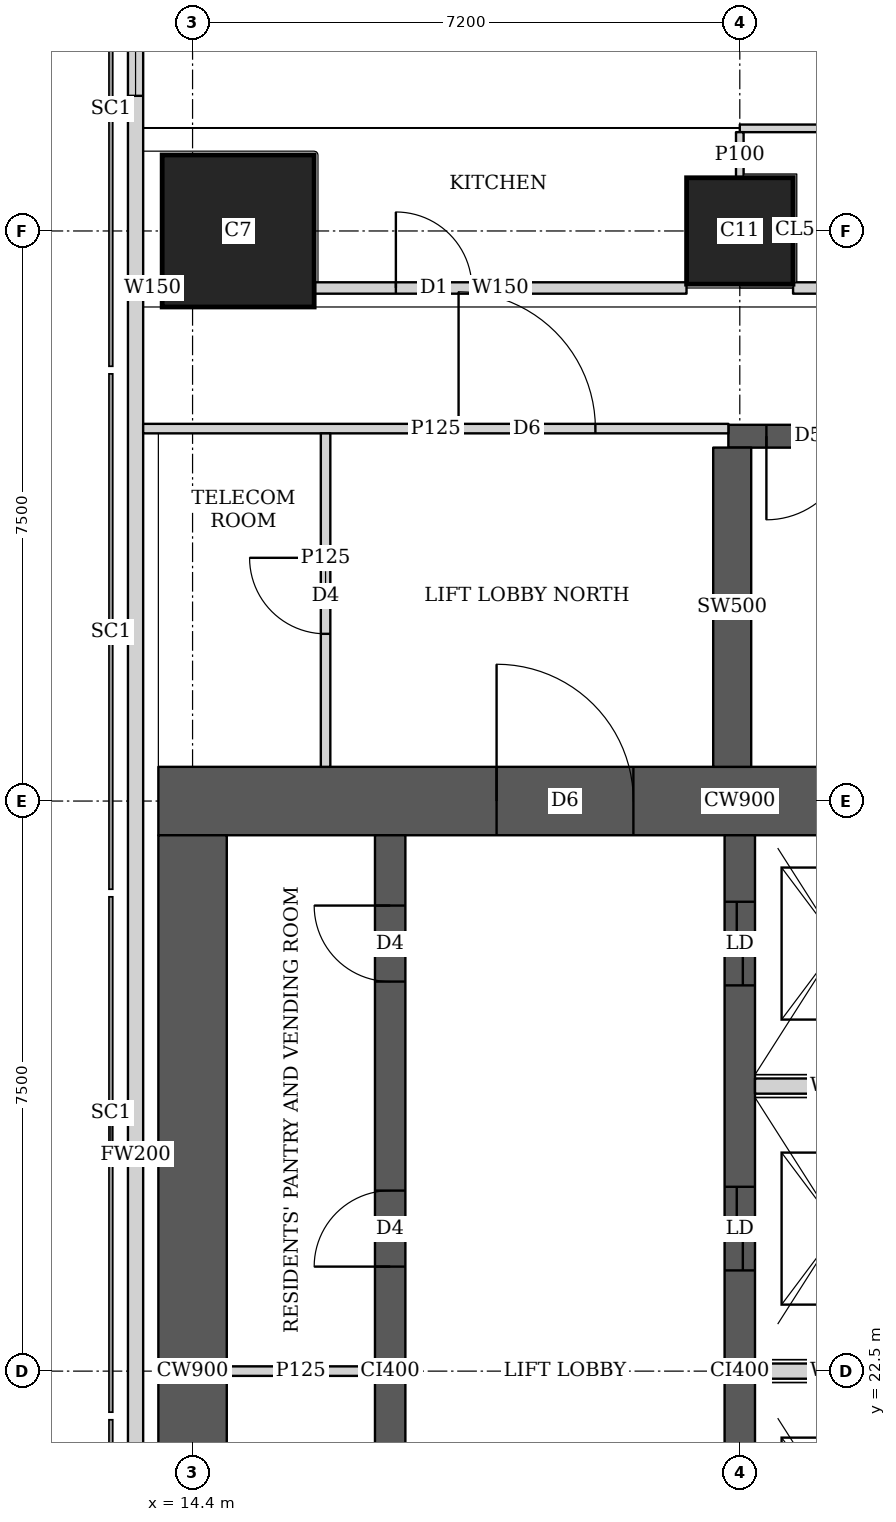
"""IFC4 building model, lengths in metres.
Left out: names, types, materials, properties, quantities, classifications, styles, units other than length and angle.
Written with IfcOpenShell. Run it as: python <this file> out.ifc"""

import sys

from ifc_helpers import new_model, si_unit, direction, frame, frame_2d, origin, origin_2d, place, context, subcontext, project, spatial, rectangle, extrude, element, fill, save


model = new_model("IFC4")
c1 = context("Model", 3, precision=1e-05, world=origin(), true_north=direction((0.0, 1.0)))
c2 = subcontext(c1, "Body", "Model", "MODEL_VIEW")
j1 = project(units=[si_unit("LENGTHUNIT", "METRE"), si_unit("PLANEANGLEUNIT", "RADIAN")], contexts=[c1])
p1 = place(None, origin())
s1 = spatial("IfcSite", under=j1, at=p1, CompositionType="ELEMENT")
p2 = place(p1, origin())
s2 = spatial("IfcBuilding", under=s1, at=p2, CompositionType="ELEMENT")
p3 = place(p2, frame((0.0, 0.0, 255.35)))
s3 = spatial("IfcBuildingStorey", under=s2, at=p3, CompositionType="ELEMENT", Elevation=255.35)
p4 = place(p3, frame((15.0, 37.5, 0.0), z_axis=(0.0, 0.0, 1.0), x_axis=(1.0, 0.0, 0.0)))
e1 = element("IfcColumn", 1, at=p4, inside=s3, PredefinedType="COLUMN", context=c2, shape_type="SweptSolid", body=[
    extrude(rectangle(XDim=2.0, YDim=2.0, at=origin_2d()), origin(), (0.0, 0.0, 1.0), 3.75),
])
p5 = place(p3, frame((21.6, 37.5, 0.0), z_axis=(0.0, 0.0, 1.0), x_axis=(1.0, 0.0, 0.0)))
e2 = element("IfcColumn", 2, at=p5, inside=s3, PredefinedType="COLUMN", context=c2, shape_type="SweptSolid", body=[
    extrude(rectangle(XDim=1.4, YDim=1.4, at=origin_2d()), origin(), (0.0, 0.0, 1.0), 3.75),
])
p6 = place(p3, frame((13.95, 30.0, 0.0), z_axis=(0.0, 0.0, 1.0), x_axis=(1.0, 0.0, 0.0)))
e3 = element("IfcWall", 3, at=p6, inside=s3, PredefinedType="SHEAR", context=c2, shape_type="SweptSolid", body=[
    extrude(rectangle(XDim=15.3, YDim=0.9, at=frame_2d((7.65, 0.0))), origin(), (0.0, 0.0, 1.0), 3.75),
])
p7 = place(p6, frame((4.45, 0.0, 0.0)))
e4 = element("IfcOpeningElement", 4, at=p7, cuts=e3, PredefinedType="OPENING", context=c2, shape_type="SweptSolid", body=[
    extrude(rectangle(XDim=1.8, YDim=2.1, at=frame_2d((0.9, 1.05))), frame((0.0, 0.46, 0.0), z_axis=(0.0, -1.0, 0.0), x_axis=(1.0, 0.0, 0.0)), (0.0, 0.0, 1.0), 0.92),
])
p8 = place(p6, frame((10.7, 0.0, 0.0)))
e5 = element("IfcOpeningElement", 5, at=p8, cuts=e3, PredefinedType="OPENING", context=c2, shape_type="SweptSolid", body=[
    extrude(rectangle(XDim=1.1, YDim=2.1, at=frame_2d((0.55, 1.05))), frame((0.0, 0.46, 0.0), z_axis=(0.0, -1.0, 0.0), x_axis=(1.0, 0.0, 0.0)), (0.0, 0.0, 1.0), 0.92),
])
p9 = place(p3, frame((14.4, 15.45, 0.0), z_axis=(0.0, 0.0, 1.0), x_axis=(0.0, 1.0, 0.0)))
e6 = element("IfcWall", 6, at=p9, inside=s3, PredefinedType="SHEAR", context=c2, shape_type="SweptSolid", body=[
    extrude(rectangle(XDim=14.1, YDim=0.9, at=frame_2d((7.05, 0.0))), origin(), (0.0, 0.0, 1.0), 3.75),
])
p10 = place(p3, frame((17.0, 15.45, 0.0), z_axis=(0.0, 0.0, 1.0), x_axis=(0.0, 1.0, 0.0)))
e7 = element("IfcWall", 7, at=p10, inside=s3, PredefinedType="SHEAR", context=c2, shape_type="SweptSolid", body=[
    extrude(rectangle(XDim=14.1, YDim=0.4, at=frame_2d((7.05, 0.0))), origin(), (0.0, 0.0, 1.0), 3.75),
])
p11 = place(p10, frame((1.05, 0.0, 0.0)))
e8 = element("IfcOpeningElement", 8, at=p11, cuts=e7, PredefinedType="OPENING", context=c2, shape_type="SweptSolid", body=[
    extrude(rectangle(XDim=1.0, YDim=2.1, at=frame_2d((0.5, 1.05))), frame((0.0, 0.21, 0.0), z_axis=(0.0, -1.0, 0.0), x_axis=(1.0, 0.0, 0.0)), (0.0, 0.0, 1.0), 0.42),
])
p12 = place(p10, frame((4.675, 0.0, 0.0)))
e9 = element("IfcOpeningElement", 9, at=p12, cuts=e7, PredefinedType="OPENING", context=c2, shape_type="SweptSolid", body=[
    extrude(rectangle(XDim=1.0, YDim=2.1, at=frame_2d((0.5, 1.05))), frame((0.0, 0.21, 0.0), z_axis=(0.0, -1.0, 0.0), x_axis=(1.0, 0.0, 0.0)), (0.0, 0.0, 1.0), 0.42),
])
p13 = place(p10, frame((8.425, 0.0, 0.0)))
e10 = element("IfcOpeningElement", 10, at=p13, cuts=e7, PredefinedType="OPENING", context=c2, shape_type="SweptSolid", body=[
    extrude(rectangle(XDim=1.0, YDim=2.1, at=frame_2d((0.5, 1.05))), frame((0.0, 0.21, 0.0), z_axis=(0.0, -1.0, 0.0), x_axis=(1.0, 0.0, 0.0)), (0.0, 0.0, 1.0), 0.42),
])
p14 = place(p10, frame((12.175, 0.0, 0.0)))
e11 = element("IfcOpeningElement", 11, at=p14, cuts=e7, PredefinedType="OPENING", context=c2, shape_type="SweptSolid", body=[
    extrude(rectangle(XDim=1.0, YDim=2.1, at=frame_2d((0.5, 1.05))), frame((0.0, 0.21, 0.0), z_axis=(0.0, -1.0, 0.0), x_axis=(1.0, 0.0, 0.0)), (0.0, 0.0, 1.0), 0.42),
])
p15 = place(p3, frame((21.6, 15.45, 0.0), z_axis=(0.0, 0.0, 1.0), x_axis=(0.0, 1.0, 0.0)))
e12 = element("IfcWall", 12, at=p15, inside=s3, PredefinedType="SHEAR", context=c2, shape_type="SweptSolid", body=[
    extrude(rectangle(XDim=14.1, YDim=0.4, at=frame_2d((7.05, 0.0))), origin(), (0.0, 0.0, 1.0), 3.75),
])
p16 = place(p15, frame((0.875, 0.0, 0.0)))
e13 = element("IfcOpeningElement", 13, at=p16, cuts=e12, PredefinedType="OPENING", context=c2, shape_type="SweptSolid", body=[
    extrude(rectangle(XDim=1.1, YDim=2.1, at=frame_2d((0.55, 1.05))), frame((0.0, 0.21, 0.0), z_axis=(0.0, -1.0, 0.0), x_axis=(1.0, 0.0, 0.0)), (0.0, 0.0, 1.0), 0.42),
])
p17 = place(p15, frame((4.625, 0.0, 0.0)))
e14 = element("IfcOpeningElement", 14, at=p17, cuts=e12, PredefinedType="OPENING", context=c2, shape_type="SweptSolid", body=[
    extrude(rectangle(XDim=1.1, YDim=2.1, at=frame_2d((0.55, 1.05))), frame((0.0, 0.21, 0.0), z_axis=(0.0, -1.0, 0.0), x_axis=(1.0, 0.0, 0.0)), (0.0, 0.0, 1.0), 0.42),
])
p18 = place(p15, frame((8.375, 0.0, 0.0)))
e15 = element("IfcOpeningElement", 15, at=p18, cuts=e12, PredefinedType="OPENING", context=c2, shape_type="SweptSolid", body=[
    extrude(rectangle(XDim=1.1, YDim=2.1, at=frame_2d((0.55, 1.05))), frame((0.0, 0.21, 0.0), z_axis=(0.0, -1.0, 0.0), x_axis=(1.0, 0.0, 0.0)), (0.0, 0.0, 1.0), 0.42),
])
p19 = place(p15, frame((12.125, 0.0, 0.0)))
e16 = element("IfcOpeningElement", 16, at=p19, cuts=e12, PredefinedType="OPENING", context=c2, shape_type="SweptSolid", body=[
    extrude(rectangle(XDim=1.1, YDim=2.1, at=frame_2d((0.55, 1.05))), frame((0.0, 0.21, 0.0), z_axis=(0.0, -1.0, 0.0), x_axis=(1.0, 0.0, 0.0)), (0.0, 0.0, 1.0), 0.42),
])
p20 = place(p3, frame((21.45, 34.8, 0.0), z_axis=(0.0, 0.0, 1.0), x_axis=(1.0, 0.0, 0.0)))
e17 = element("IfcWall", 17, at=p20, inside=s3, PredefinedType="SHEAR", context=c2, shape_type="SweptSolid", body=[
    extrude(rectangle(XDim=7.5, YDim=0.3, at=frame_2d((3.75, 0.0))), origin(), (0.0, 0.0, 1.0), 3.75),
])
p21 = place(p20, frame((0.5, 0.0, 0.0)))
e18 = element("IfcOpeningElement", 18, at=p21, cuts=e17, PredefinedType="OPENING", context=c2, shape_type="SweptSolid", body=[
    extrude(rectangle(XDim=1.1, YDim=2.1, at=frame_2d((0.55, 1.05))), frame((0.0, 0.16, 0.0), z_axis=(0.0, -1.0, 0.0), x_axis=(1.0, 0.0, 0.0)), (0.0, 0.0, 1.0), 0.32),
])
p22 = place(p3, frame((21.5, 30.45, 0.0), z_axis=(0.0, 0.0, 1.0), x_axis=(0.0, 1.0, 0.0)))
e19 = element("IfcWall", 19, at=p22, inside=s3, PredefinedType="SHEAR", context=c2, shape_type="SweptSolid", body=[
    extrude(rectangle(XDim=4.2, YDim=0.5, at=frame_2d((2.1, 0.0))), origin(), (0.0, 0.0, 1.0), 3.75),
])
p23 = place(p3, frame((13.65, 43.037, 0.0), z_axis=(0.0, 0.0, 1.0), x_axis=(0.0, -1.0, 0.0)))
e20 = element("IfcWall", 20, at=p23, inside=s3, PredefinedType="SOLIDWALL", context=c2, shape_type="SweptSolid", body=[
    extrude(rectangle(XDim=35.374, YDim=0.2, at=frame_2d((17.687, 0.0))), origin(), (0.0, 0.0, 1.0), 3.5),
])
p24 = place(p23, frame((1.959, 0.0, 0.9)))
e21 = element("IfcOpeningElement", 21, at=p24, cuts=e20, PredefinedType="OPENING", context=c2, shape_type="SweptSolid", body=[
    extrude(rectangle(XDim=1.8, YDim=1.5, at=frame_2d((0.9, 0.75))), frame((0.0, 0.11, 0.0), z_axis=(0.0, -1.0, 0.0), x_axis=(1.0, 0.0, 0.0)), (0.0, 0.0, 1.0), 0.22),
])
p25 = place(p3, frame((13.75, 36.75, 0.0), z_axis=(0.0, 0.0, 1.0), x_axis=(1.0, 0.0, 0.0)))
e22 = element("IfcWall", 22, at=p25, inside=s3, PredefinedType="SOLIDWALL", context=c2, shape_type="SweptSolid", body=[
    extrude(rectangle(XDim=0.249, YDim=0.15, at=frame_2d((0.125, 0.0))), origin(), (0.0, 0.0, 1.0), 3.5),
])
p26 = place(p3, frame((16.001, 36.75, 0.0), z_axis=(0.0, 0.0, 1.0), x_axis=(1.0, 0.0, 0.0)))
e23 = element("IfcWall", 23, at=p26, inside=s3, PredefinedType="SOLIDWALL", context=c2, shape_type="SweptSolid", body=[
    extrude(rectangle(XDim=4.898, YDim=0.15, at=frame_2d((2.449, 0.0))), origin(), (0.0, 0.0, 1.0), 3.5),
])
p27 = place(p26, frame((1.074, 0.0, 0.0)))
e24 = element("IfcOpeningElement", 24, at=p27, cuts=e23, PredefinedType="OPENING", context=c2, shape_type="SweptSolid", body=[
    extrude(rectangle(XDim=1.0, YDim=2.1, at=frame_2d((0.5, 1.05))), frame((0.0, 0.085, 0.0), z_axis=(0.0, -1.0, 0.0), x_axis=(1.0, 0.0, 0.0)), (0.0, 0.0, 1.0), 0.17),
])
p28 = place(p3, frame((22.301, 36.75, 0.0), z_axis=(0.0, 0.0, 1.0), x_axis=(1.0, 0.0, 0.0)))
e25 = element("IfcWall", 25, at=p28, inside=s3, PredefinedType="SOLIDWALL", context=c2, shape_type="SweptSolid", body=[
    extrude(rectangle(XDim=5.798, YDim=0.15, at=frame_2d((2.899, 0.0))), origin(), (0.0, 0.0, 1.0), 3.5),
])
p29 = place(p3, frame((21.6, 38.85, 0.0), z_axis=(0.0, 0.0, 1.0), x_axis=(1.0, 0.0, 0.0)))
e26 = element("IfcWall", 26, at=p29, inside=s3, PredefinedType="PARTITIONING", context=c2, shape_type="SweptSolid", body=[
    extrude(rectangle(XDim=3.475, YDim=0.1, at=frame_2d((1.737, 0.0))), origin(), (0.0, 0.0, 1.0), 3.5),
])
p30 = place(p29, frame((1.35, 0.0, 0.0)))
e27 = element("IfcOpeningElement", 27, at=p30, cuts=e26, PredefinedType="OPENING", context=c2, shape_type="SweptSolid", body=[
    extrude(rectangle(XDim=0.9, YDim=2.1, at=frame_2d((0.45, 1.05))), frame((0.0, 0.06, 0.0), z_axis=(0.0, -1.0, 0.0), x_axis=(1.0, 0.0, 0.0)), (0.0, 0.0, 1.0), 0.12),
])
p31 = place(p3, frame((21.6, 38.201, 0.0), z_axis=(0.0, 0.0, 1.0), x_axis=(0.0, 1.0, 0.0)))
e28 = element("IfcWall", 28, at=p31, inside=s3, PredefinedType="PARTITIONING", context=c2, shape_type="SweptSolid", body=[
    extrude(rectangle(XDim=0.599, YDim=0.1, at=frame_2d((0.3, 0.0))), origin(), (0.0, 0.0, 1.0), 3.5),
])
p32 = place(p3, frame((13.75, 34.9, 0.0), z_axis=(0.0, 0.0, 1.0), x_axis=(1.0, 0.0, 0.0)))
e29 = element("IfcWall", 29, at=p32, inside=s3, PredefinedType="PARTITIONING", context=c2, shape_type="SweptSolid", body=[
    extrude(rectangle(XDim=7.7, YDim=0.125, at=frame_2d((3.85, 0.0))), origin(), (0.0, 0.0, 1.0), 3.5),
])
p33 = place(p32, frame((4.15, 0.0, 0.0)))
e30 = element("IfcOpeningElement", 30, at=p33, cuts=e29, PredefinedType="OPENING", context=c2, shape_type="SweptSolid", body=[
    extrude(rectangle(XDim=1.8, YDim=2.1, at=frame_2d((0.9, 1.05))), frame((0.0, 0.073, 0.0), z_axis=(0.0, -1.0, 0.0), x_axis=(1.0, 0.0, 0.0)), (0.0, 0.0, 1.0), 0.145),
])
p34 = place(p3, frame((16.15, 30.45, 0.0), z_axis=(0.0, 0.0, 1.0), x_axis=(0.0, 1.0, 0.0)))
e31 = element("IfcWall", 31, at=p34, inside=s3, PredefinedType="PARTITIONING", context=c2, shape_type="SweptSolid", body=[
    extrude(rectangle(XDim=4.387, YDim=0.125, at=frame_2d((2.193, 0.0))), origin(), (0.0, 0.0, 1.0), 3.5),
])
p35 = place(p34, frame((1.75, 0.0, 0.0)))
e32 = element("IfcOpeningElement", 32, at=p35, cuts=e31, PredefinedType="OPENING", context=c2, shape_type="SweptSolid", body=[
    extrude(rectangle(XDim=1.0, YDim=2.1, at=frame_2d((0.5, 1.05))), frame((0.0, 0.073, 0.0), z_axis=(0.0, -1.0, 0.0), x_axis=(1.0, 0.0, 0.0)), (0.0, 0.0, 1.0), 0.145),
])
p36 = place(p3, frame((14.85, 22.5, 0.0), z_axis=(0.0, 0.0, 1.0), x_axis=(1.0, 0.0, 0.0)))
e33 = element("IfcWall", 33, at=p36, inside=s3, PredefinedType="PARTITIONING", context=c2, shape_type="SweptSolid", body=[
    extrude(rectangle(XDim=1.95, YDim=0.125, at=frame_2d((0.975, 0.0))), origin(), (0.0, 0.0, 1.0), 3.5),
])
for number, where, z_axis, x_axis in (
    (34, (21.8, 22.5, 0.0), (0.0, 0.0, 1.0), (1.0, 0.0, 0.0)),
    (35, (21.8, 26.25, 0.0), (0.0, 0.0, 1.0), (1.0, 0.0, 0.0)),
):
    element("IfcWall", number, at=place(p3, frame(where, z_axis=z_axis, x_axis=x_axis)), inside=s3, PredefinedType="SOLIDWALL", context=c2, shape_type="SweptSolid", body=[
        extrude(rectangle(XDim=2.2, YDim=0.2, at=frame_2d((1.1, 0.0))), origin(), (0.0, 0.0, 1.0), 3.5),
    ])
p37 = place(p24, origin())
e36 = element("IfcWindow", 36, at=p37, inside=s3, PartitioningType="SINGLE_PANEL", PredefinedType="WINDOW", context=c2, shape_type="SweptSolid", body=[
    extrude(rectangle(XDim=1.8, YDim=1.5, at=frame_2d((0.9, 0.75))), frame((0.0, 0.03, 0.0), z_axis=(0.0, -1.0, 0.0), x_axis=(1.0, 0.0, 0.0)), (0.0, 0.0, 1.0), 0.06),
])
fill(e21, e36)
p38 = place(p27, origin())
e37 = element("IfcDoor", 37, at=p38, inside=s3, OperationType="SINGLE_SWING_LEFT", PredefinedType="DOOR", context=c2, shape_type="SweptSolid", body=[
    extrude(rectangle(XDim=1.0, YDim=2.1, at=frame_2d((0.5, 1.05))), frame((0.0, 0.025, 0.0), z_axis=(0.0, -1.0, 0.0), x_axis=(1.0, 0.0, 0.0)), (0.0, 0.0, 1.0), 0.05),
])
fill(e24, e37)
p39 = place(p35, origin())
e38 = element("IfcDoor", 38, at=p39, inside=s3, OperationType="SINGLE_SWING_RIGHT", PredefinedType="DOOR", context=c2, shape_type="SweptSolid", body=[
    extrude(rectangle(XDim=1.0, YDim=2.1, at=frame_2d((0.5, 1.05))), frame((0.0, 0.025, 0.0), z_axis=(0.0, -1.0, 0.0), x_axis=(1.0, 0.0, 0.0)), (0.0, 0.0, 1.0), 0.05),
])
fill(e32, e38)
p40 = place(p33, origin())
e39 = element("IfcDoor", 39, at=p40, inside=s3, OperationType="DOUBLE_DOOR_SINGLE_SWING", PredefinedType="DOOR", context=c2, shape_type="SweptSolid", body=[
    extrude(rectangle(XDim=1.8, YDim=2.1, at=frame_2d((0.9, 1.05))), frame((0.0, 0.025, 0.0), z_axis=(0.0, -1.0, 0.0), x_axis=(1.0, 0.0, 0.0)), (0.0, 0.0, 1.0), 0.05),
])
fill(e30, e39)
p41 = place(p13, origin())
e40 = element("IfcDoor", 40, at=p41, inside=s3, OperationType="SINGLE_SWING_LEFT", PredefinedType="DOOR", context=c2, shape_type="SweptSolid", body=[
    extrude(rectangle(XDim=1.0, YDim=2.1, at=frame_2d((0.5, 1.05))), frame((0.0, 0.025, 0.0), z_axis=(0.0, -1.0, 0.0), x_axis=(1.0, 0.0, 0.0)), (0.0, 0.0, 1.0), 0.05),
])
fill(e10, e40)
p42 = place(p14, origin())
e41 = element("IfcDoor", 41, at=p42, inside=s3, OperationType="SINGLE_SWING_RIGHT", PredefinedType="DOOR", context=c2, shape_type="SweptSolid", body=[
    extrude(rectangle(XDim=1.0, YDim=2.1, at=frame_2d((0.5, 1.05))), frame((0.0, 0.025, 0.0), z_axis=(0.0, -1.0, 0.0), x_axis=(1.0, 0.0, 0.0)), (0.0, 0.0, 1.0), 0.05),
])
fill(e11, e41)
p43 = place(p7, origin())
e42 = element("IfcDoor", 42, at=p43, inside=s3, OperationType="DOUBLE_DOOR_SINGLE_SWING", PredefinedType="DOOR", context=c2, shape_type="SweptSolid", body=[
    extrude(rectangle(XDim=1.8, YDim=2.1, at=frame_2d((0.9, 1.05))), frame((0.0, 0.025, 0.0), z_axis=(0.0, -1.0, 0.0), x_axis=(1.0, 0.0, 0.0)), (0.0, 0.0, 1.0), 0.05),
])
fill(e4, e42)
p44 = place(p18, origin())
e43 = element("IfcDoor", 43, at=p44, inside=s3, OperationType="DOUBLE_DOOR_SLIDING", PredefinedType="DOOR", context=c2, shape_type="SweptSolid", body=[
    extrude(rectangle(XDim=1.1, YDim=2.1, at=frame_2d((0.55, 1.05))), frame((0.0, 0.025, 0.0), z_axis=(0.0, -1.0, 0.0), x_axis=(1.0, 0.0, 0.0)), (0.0, 0.0, 1.0), 0.05),
])
fill(e15, e43)
p45 = place(p19, origin())
e44 = element("IfcDoor", 44, at=p45, inside=s3, OperationType="DOUBLE_DOOR_SLIDING", PredefinedType="DOOR", context=c2, shape_type="SweptSolid", body=[
    extrude(rectangle(XDim=1.1, YDim=2.1, at=frame_2d((0.55, 1.05))), frame((0.0, 0.025, 0.0), z_axis=(0.0, -1.0, 0.0), x_axis=(1.0, 0.0, 0.0)), (0.0, 0.0, 1.0), 0.05),
])
fill(e16, e44)
p46 = place(p21, origin())
e45 = element("IfcDoor", 45, at=p46, inside=s3, OperationType="SINGLE_SWING_RIGHT", PredefinedType="DOOR", context=c2, shape_type="SweptSolid", body=[
    extrude(rectangle(XDim=1.1, YDim=2.1, at=frame_2d((0.55, 1.05))), frame((0.0, 0.025, 0.0), z_axis=(0.0, -1.0, 0.0), x_axis=(1.0, 0.0, 0.0)), (0.0, 0.0, 1.0), 0.05),
])
fill(e18, e45)
save(model, sys.argv[1])
